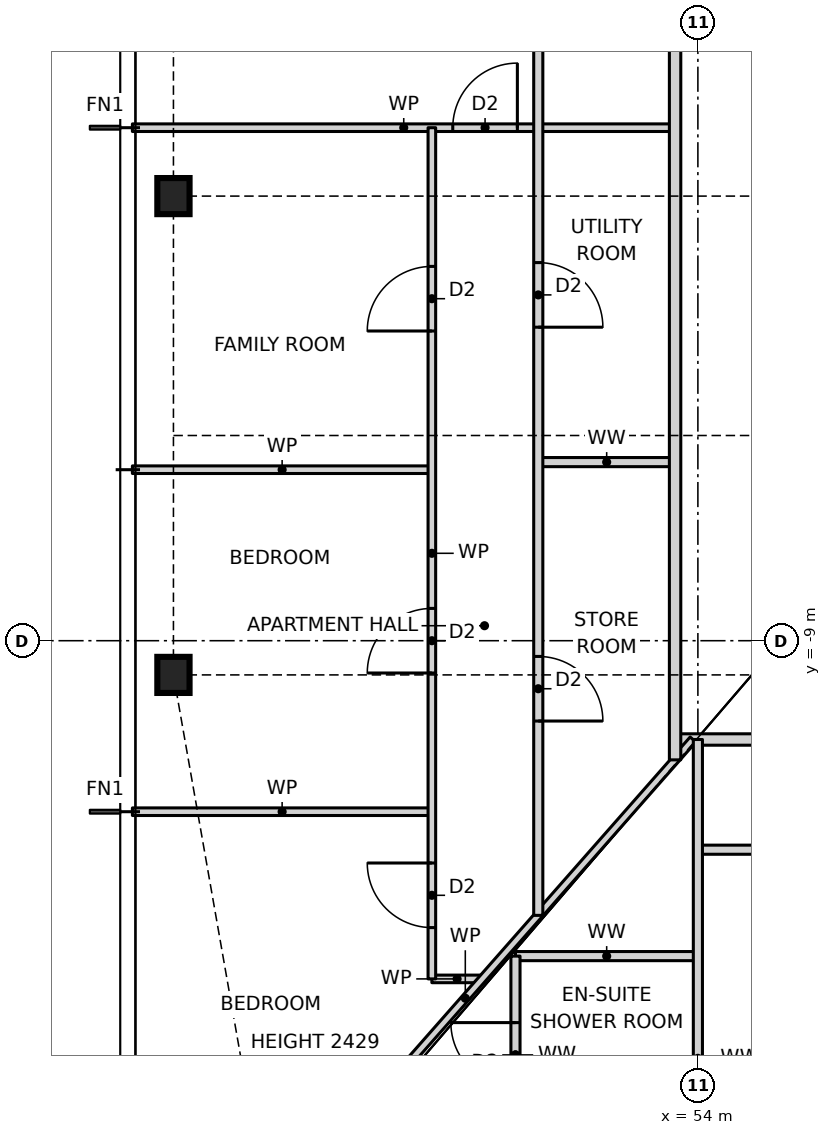
"""IFC4 building model, lengths in metres.
Left out: names, types, materials, properties, quantities, classifications, styles, units other than length and angle.
Written with IfcOpenShell. Run it as: python <this file> out.ifc"""

import sys

from ifc_helpers import new_model, si_unit, direction, frame, frame_2d, origin, origin_2d, place, context, subcontext, project, spatial, rectangle, i_section, extrude, element, fill, save


model = new_model("IFC4")
c1 = context("Model", 3, precision=1e-05, world=origin(), true_north=direction((0.0, 1.0)))
c2 = subcontext(c1, "Body", "Model", "MODEL_VIEW")
j1 = project(units=[si_unit("LENGTHUNIT", "METRE"), si_unit("PLANEANGLEUNIT", "RADIAN")], contexts=[c1])
p1 = place(None, origin())
s1 = spatial("IfcSite", under=j1, at=p1, CompositionType="ELEMENT")
p2 = place(p1, origin())
s2 = spatial("IfcBuilding", under=s1, at=p2, CompositionType="ELEMENT")
p3 = place(p2, frame((0.0, 0.0, 25.5)))
s3 = spatial("IfcBuildingStorey", under=s2, at=p3, CompositionType="ELEMENT", Elevation=25.5)
for number, where, z_axis, x_axis in (
    (1, (47.1, -3.15, 0.0), (0.0, 0.0, 1.0), (1.0, 0.0, 0.0)),
    (2, (47.1, -9.45, 0.0), (0.0, 0.0, 1.0), (1.0, 0.0, 0.0)),
):
    element("IfcColumn", number, at=place(p3, frame(where, z_axis=z_axis, x_axis=x_axis)), inside=s3, PredefinedType="COLUMN", context=c2, shape_type="SweptSolid", body=[
        extrude(i_section(OverallWidth=0.424, OverallDepth=0.475, WebThickness=0.048, FlangeThickness=0.077, at=origin_2d()), origin(), (0.0, 0.0, 1.0), 3.5),
    ])
p4 = place(p3, frame((50.5, -13.45, 0.0), z_axis=(0.0, 0.0, 1.0), x_axis=(1.0, 0.0, 0.0)))
e3 = element("IfcWall", 3, at=p4, inside=s3, PredefinedType="PARTITIONING", context=c2, shape_type="SweptSolid", body=[
    extrude(rectangle(XDim=0.664, YDim=0.1, at=frame_2d((0.332, 0.0))), origin(), (0.0, 0.0, 1.0), 3.27),
])
p5 = place(p3, frame((51.6, -13.15, 0.0), z_axis=(0.0, 0.0, 1.0), x_axis=(1.0, 0.0, 0.0)))
e4 = element("IfcWall", 4, at=p5, inside=s3, PredefinedType="PARTITIONING", context=c2, shape_type="SweptSolid", body=[
    extrude(rectangle(XDim=2.4, YDim=0.12, at=frame_2d((1.2, 0.0))), origin(), (0.0, 0.0, 1.0), 3.27),
])
p6 = place(p3, frame((54.0, -11.75, 0.0), z_axis=(0.0, 0.0, 1.0), x_axis=(1.0, 0.0, 0.0)))
e5 = element("IfcWall", 5, at=p6, inside=s3, PredefinedType="PARTITIONING", context=c2, shape_type="SweptSolid", body=[
    extrude(rectangle(XDim=19.34, YDim=0.12, at=frame_2d((9.67, 0.0))), origin(), (0.0, 0.0, 1.0), 3.27),
])
p7 = place(p6, frame((1.375, 0.0, 0.0)))
e6 = element("IfcOpeningElement", 6, at=p7, cuts=e5, PredefinedType="OPENING", context=c2, shape_type="SweptSolid", body=[
    extrude(rectangle(XDim=0.85, YDim=2.1, at=frame_2d((0.425, 1.05))), frame((0.0, 0.07, 0.0), z_axis=(0.0, -1.0, 0.0), x_axis=(1.0, 0.0, 0.0)), (0.0, 0.0, 1.0), 0.14),
])
p8 = place(p6, frame((4.575, 0.0, 0.0)))
e7 = element("IfcOpeningElement", 7, at=p8, cuts=e5, PredefinedType="OPENING", context=c2, shape_type="SweptSolid", body=[
    extrude(rectangle(XDim=0.85, YDim=2.1, at=frame_2d((0.425, 1.05))), frame((0.0, 0.07, 0.0), z_axis=(0.0, -1.0, 0.0), x_axis=(1.0, 0.0, 0.0)), (0.0, 0.0, 1.0), 0.14),
])
p9 = place(p6, frame((11.325, 0.0, 0.0)))
e8 = element("IfcOpeningElement", 8, at=p9, cuts=e5, PredefinedType="OPENING", context=c2, shape_type="SweptSolid", body=[
    extrude(rectangle(XDim=0.85, YDim=2.1, at=frame_2d((0.425, 1.05))), frame((0.0, 0.07, 0.0), z_axis=(0.0, -1.0, 0.0), x_axis=(1.0, 0.0, 0.0)), (0.0, 0.0, 1.0), 0.14),
])
p10 = place(p6, frame((16.495, 0.0, 0.0)))
e9 = element("IfcOpeningElement", 9, at=p10, cuts=e5, PredefinedType="OPENING", context=c2, shape_type="SweptSolid", body=[
    extrude(rectangle(XDim=0.85, YDim=2.1, at=frame_2d((0.425, 1.05))), frame((0.0, 0.07, 0.0), z_axis=(0.0, -1.0, 0.0), x_axis=(1.0, 0.0, 0.0)), (0.0, 0.0, 1.0), 0.14),
])
p11 = place(p3, frame((46.56, -11.25, 0.0), z_axis=(0.0, 0.0, 1.0), x_axis=(1.0, 0.0, 0.0)))
e10 = element("IfcWall", 10, at=p11, inside=s3, PredefinedType="PARTITIONING", context=c2, shape_type="SweptSolid", body=[
    extrude(rectangle(XDim=3.94, YDim=0.1, at=frame_2d((1.97, 0.0))), origin(), (0.0, 0.0, 1.0), 3.27),
])
p12 = place(p3, frame((53.7, -10.3, 0.0), z_axis=(0.0, 0.0, 1.0), x_axis=(1.0, 0.0, 0.0)))
e11 = element("IfcWall", 11, at=p12, inside=s3, PredefinedType="PARTITIONING", context=c2, shape_type="SweptSolid", body=[
    extrude(rectangle(XDim=18.6, YDim=0.15, at=frame_2d((9.3, 0.0))), origin(), (0.0, 0.0, 1.0), 3.27),
])
p13 = place(p12, frame((4.8, 0.0, 0.0)))
e12 = element("IfcOpeningElement", 12, at=p13, cuts=e11, PredefinedType="OPENING", context=c2, shape_type="SweptSolid", body=[
    extrude(rectangle(XDim=1.0, YDim=2.1, at=frame_2d((0.5, 1.05))), frame((0.0, 0.085, 0.0), z_axis=(0.0, -1.0, 0.0), x_axis=(1.0, 0.0, 0.0)), (0.0, 0.0, 1.0), 0.17),
])
p14 = place(p3, frame((46.56, -6.75, 0.0), z_axis=(0.0, 0.0, 1.0), x_axis=(1.0, 0.0, 0.0)))
e13 = element("IfcWall", 13, at=p14, inside=s3, PredefinedType="PARTITIONING", context=c2, shape_type="SweptSolid", body=[
    extrude(rectangle(XDim=3.94, YDim=0.1, at=frame_2d((1.97, 0.0))), origin(), (0.0, 0.0, 1.0), 3.27),
])
p15 = place(p3, frame((51.9, -6.65, 0.0), z_axis=(0.0, 0.0, 1.0), x_axis=(1.0, 0.0, 0.0)))
e14 = element("IfcWall", 14, at=p15, inside=s3, PredefinedType="PARTITIONING", context=c2, shape_type="SweptSolid", body=[
    extrude(rectangle(XDim=1.8, YDim=0.12, at=frame_2d((0.9, 0.0))), origin(), (0.0, 0.0, 1.0), 3.27),
])
p16 = place(p3, frame((46.56, -2.25, 0.0), z_axis=(0.0, 0.0, 1.0), x_axis=(1.0, 0.0, 0.0)))
e15 = element("IfcWall", 15, at=p16, inside=s3, PredefinedType="PARTITIONING", context=c2, shape_type="SweptSolid", body=[
    extrude(rectangle(XDim=7.14, YDim=0.1, at=frame_2d((3.57, 0.0))), origin(), (0.0, 0.0, 1.0), 3.27),
])
p17 = place(p16, frame((4.215, 0.0, 0.0)))
e16 = element("IfcOpeningElement", 16, at=p17, cuts=e15, PredefinedType="OPENING", context=c2, shape_type="SweptSolid", body=[
    extrude(rectangle(XDim=0.85, YDim=2.1, at=frame_2d((0.425, 1.05))), frame((0.0, 0.06, 0.0), z_axis=(0.0, -1.0, 0.0), x_axis=(1.0, 0.0, 0.0)), (0.0, 0.0, 1.0), 0.12),
])
p18 = place(p3, frame((47.944, -17.109, 0.0), z_axis=(0.0, 0.0, 1.0), x_axis=(0.660638210404, 0.750704439146, 0.0)))
e17 = element("IfcWall", 17, at=p18, inside=s3, PredefinedType="PARTITIONING", context=c2, shape_type="SweptSolid", body=[
    extrude(rectangle(XDim=9.07, YDim=0.1, at=frame_2d((4.535, 0.0))), origin(), (0.0, 0.0, 1.0), 2.429),
])
p19 = place(p3, frame((54.0, -18.69, 0.0), z_axis=(0.0, 0.0, 1.0), x_axis=(0.0, 1.0, 0.0)))
e18 = element("IfcWall", 18, at=p19, inside=s3, PredefinedType="PARTITIONING", context=c2, shape_type="SweptSolid", body=[
    extrude(rectangle(XDim=8.39, YDim=0.12, at=frame_2d((4.195, 0.0))), origin(), (0.0, 0.0, 1.0), 3.27),
])
p20 = place(p19, frame((1.045, 0.0, 0.0)))
e19 = element("IfcOpeningElement", 19, at=p20, cuts=e18, PredefinedType="OPENING", context=c2, shape_type="SweptSolid", body=[
    extrude(rectangle(XDim=0.85, YDim=2.1, at=frame_2d((0.425, 1.05))), frame((0.0, 0.07, 0.0), z_axis=(0.0, -1.0, 0.0), x_axis=(1.0, 0.0, 0.0)), (0.0, 0.0, 1.0), 0.14),
])
p21 = place(p3, frame((53.7, -10.568, 0.0), z_axis=(0.0, 0.0, 1.0), x_axis=(0.0, 1.0, 0.0)))
e20 = element("IfcWall", 20, at=p21, inside=s3, PredefinedType="PARTITIONING", context=c2, shape_type="SweptSolid", body=[
    extrude(rectangle(XDim=21.136, YDim=0.15, at=frame_2d((10.568, 0.0))), origin(), (0.0, 0.0, 1.0), 3.27),
])
p22 = place(p21, frame((11.818, 0.0, 0.0)))
e21 = element("IfcOpeningElement", 21, at=p22, cuts=e20, PredefinedType="OPENING", context=c2, shape_type="SweptSolid", body=[
    extrude(rectangle(XDim=1.0, YDim=2.1, at=frame_2d((0.5, 1.05))), frame((0.0, 0.085, 0.0), z_axis=(0.0, -1.0, 0.0), x_axis=(1.0, 0.0, 0.0)), (0.0, 0.0, 1.0), 0.17),
])
p23 = place(p3, frame((51.9, -12.614, 0.0), z_axis=(0.0, 0.0, 1.0), x_axis=(0.0, 1.0, 0.0)))
e22 = element("IfcWall", 22, at=p23, inside=s3, PredefinedType="PARTITIONING", context=c2, shape_type="SweptSolid", body=[
    extrude(rectangle(XDim=25.228, YDim=0.12, at=frame_2d((12.614, 0.0))), origin(), (0.0, 0.0, 1.0), 3.27),
])
p24 = place(p23, frame((17.139, 0.0, 0.0)))
e23 = element("IfcOpeningElement", 23, at=p24, cuts=e22, PredefinedType="OPENING", context=c2, shape_type="SweptSolid", body=[
    extrude(rectangle(XDim=0.85, YDim=2.1, at=frame_2d((0.425, 1.05))), frame((0.0, 0.07, 0.0), z_axis=(0.0, -1.0, 0.0), x_axis=(1.0, 0.0, 0.0)), (0.0, 0.0, 1.0), 0.14),
])
p25 = place(p23, frame((13.939, 0.0, 0.0)))
e24 = element("IfcOpeningElement", 24, at=p25, cuts=e22, PredefinedType="OPENING", context=c2, shape_type="SweptSolid", body=[
    extrude(rectangle(XDim=0.85, YDim=2.1, at=frame_2d((0.425, 1.05))), frame((0.0, 0.07, 0.0), z_axis=(0.0, -1.0, 0.0), x_axis=(1.0, 0.0, 0.0)), (0.0, 0.0, 1.0), 0.14),
])
p26 = place(p23, frame((21.871, 0.0, 0.0)))
e25 = element("IfcOpeningElement", 25, at=p26, cuts=e22, PredefinedType="OPENING", context=c2, shape_type="SweptSolid", body=[
    extrude(rectangle(XDim=0.85, YDim=2.1, at=frame_2d((0.425, 1.05))), frame((0.0, 0.07, 0.0), z_axis=(0.0, -1.0, 0.0), x_axis=(1.0, 0.0, 0.0)), (0.0, 0.0, 1.0), 0.14),
])
p27 = place(p23, frame((7.739, 0.0, 0.0)))
e26 = element("IfcOpeningElement", 26, at=p27, cuts=e22, PredefinedType="OPENING", context=c2, shape_type="SweptSolid", body=[
    extrude(rectangle(XDim=0.85, YDim=2.1, at=frame_2d((0.425, 1.05))), frame((0.0, 0.07, 0.0), z_axis=(0.0, -1.0, 0.0), x_axis=(1.0, 0.0, 0.0)), (0.0, 0.0, 1.0), 0.14),
])
p28 = place(p23, frame((2.557, 0.0, 0.0)))
e27 = element("IfcOpeningElement", 27, at=p28, cuts=e22, PredefinedType="OPENING", context=c2, shape_type="SweptSolid", body=[
    extrude(rectangle(XDim=0.85, YDim=2.1, at=frame_2d((0.425, 1.05))), frame((0.0, 0.07, 0.0), z_axis=(0.0, -1.0, 0.0), x_axis=(1.0, 0.0, 0.0)), (0.0, 0.0, 1.0), 0.14),
])
p29 = place(p3, frame((51.6, -15.75, 0.0), z_axis=(0.0, 0.0, 1.0), x_axis=(0.0, 1.0, 0.0)))
e28 = element("IfcWall", 28, at=p29, inside=s3, PredefinedType="PARTITIONING", context=c2, shape_type="SweptSolid", body=[
    extrude(rectangle(XDim=2.6, YDim=0.12, at=frame_2d((1.3, 0.0))), origin(), (0.0, 0.0, 1.0), 3.27),
])
p30 = place(p29, frame((0.875, 0.0, 0.0)))
e29 = element("IfcOpeningElement", 29, at=p30, cuts=e28, PredefinedType="OPENING", context=c2, shape_type="SweptSolid", body=[
    extrude(rectangle(XDim=0.85, YDim=2.1, at=frame_2d((0.425, 1.05))), frame((0.0, 0.07, 0.0), z_axis=(0.0, -1.0, 0.0), x_axis=(1.0, 0.0, 0.0)), (0.0, 0.0, 1.0), 0.14),
])
p31 = place(p3, frame((50.5, -13.45, 0.0), z_axis=(0.0, 0.0, 1.0), x_axis=(0.0, 1.0, 0.0)))
e30 = element("IfcWall", 30, at=p31, inside=s3, PredefinedType="PARTITIONING", context=c2, shape_type="SweptSolid", body=[
    extrude(rectangle(XDim=11.2, YDim=0.1, at=frame_2d((5.6, 0.0))), origin(), (0.0, 0.0, 1.0), 3.27),
])
p32 = place(p31, frame((8.525, 0.0, 0.0)))
e31 = element("IfcOpeningElement", 31, at=p32, cuts=e30, PredefinedType="OPENING", context=c2, shape_type="SweptSolid", body=[
    extrude(rectangle(XDim=0.85, YDim=2.1, at=frame_2d((0.425, 1.05))), frame((0.0, 0.06, 0.0), z_axis=(0.0, -1.0, 0.0), x_axis=(1.0, 0.0, 0.0)), (0.0, 0.0, 1.0), 0.12),
])
p33 = place(p31, frame((4.025, 0.0, 0.0)))
e32 = element("IfcOpeningElement", 32, at=p33, cuts=e30, PredefinedType="OPENING", context=c2, shape_type="SweptSolid", body=[
    extrude(rectangle(XDim=0.85, YDim=2.1, at=frame_2d((0.425, 1.05))), frame((0.0, 0.06, 0.0), z_axis=(0.0, -1.0, 0.0), x_axis=(1.0, 0.0, 0.0)), (0.0, 0.0, 1.0), 0.12),
])
p34 = place(p31, frame((0.675, 0.0, 0.0)))
e33 = element("IfcOpeningElement", 33, at=p34, cuts=e30, PredefinedType="OPENING", context=c2, shape_type="SweptSolid", body=[
    extrude(rectangle(XDim=0.85, YDim=2.1, at=frame_2d((0.425, 1.05))), frame((0.0, 0.06, 0.0), z_axis=(0.0, -1.0, 0.0), x_axis=(1.0, 0.0, 0.0)), (0.0, 0.0, 1.0), 0.12),
])
p35 = place(p30, origin())
e34 = element("IfcDoor", 34, at=p35, inside=s3, OperationType="SINGLE_SWING_RIGHT", PredefinedType="DOOR", context=c2, shape_type="SweptSolid", body=[
    extrude(rectangle(XDim=0.85, YDim=2.1, at=frame_2d((0.425, 1.05))), frame((0.0, 0.025, 0.0), z_axis=(0.0, -1.0, 0.0), x_axis=(1.0, 0.0, 0.0)), (0.0, 0.0, 1.0), 0.05),
])
fill(e29, e34)
p36 = place(p17, origin())
e35 = element("IfcDoor", 35, at=p36, inside=s3, OperationType="SINGLE_SWING_RIGHT", PredefinedType="DOOR", context=c2, shape_type="SweptSolid", body=[
    extrude(rectangle(XDim=0.85, YDim=2.1, at=frame_2d((0.425, 1.05))), frame((0.0, 0.025, 0.0), z_axis=(0.0, -1.0, 0.0), x_axis=(1.0, 0.0, 0.0)), (0.0, 0.0, 1.0), 0.05),
])
fill(e16, e35)
p37 = place(p32, origin())
e36 = element("IfcDoor", 36, at=p37, inside=s3, OperationType="SINGLE_SWING_LEFT", PredefinedType="DOOR", context=c2, shape_type="SweptSolid", body=[
    extrude(rectangle(XDim=0.85, YDim=2.1, at=frame_2d((0.425, 1.05))), frame((0.0, 0.025, 0.0), z_axis=(0.0, -1.0, 0.0), x_axis=(1.0, 0.0, 0.0)), (0.0, 0.0, 1.0), 0.05),
])
fill(e31, e36)
p38 = place(p33, origin())
e37 = element("IfcDoor", 37, at=p38, inside=s3, OperationType="SINGLE_SWING_LEFT", PredefinedType="DOOR", context=c2, shape_type="SweptSolid", body=[
    extrude(rectangle(XDim=0.85, YDim=2.1, at=frame_2d((0.425, 1.05))), frame((0.0, 0.025, 0.0), z_axis=(0.0, -1.0, 0.0), x_axis=(1.0, 0.0, 0.0)), (0.0, 0.0, 1.0), 0.05),
])
fill(e32, e37)
p39 = place(p34, origin())
e38 = element("IfcDoor", 38, at=p39, inside=s3, OperationType="SINGLE_SWING_RIGHT", PredefinedType="DOOR", context=c2, shape_type="SweptSolid", body=[
    extrude(rectangle(XDim=0.85, YDim=2.1, at=frame_2d((0.425, 1.05))), frame((0.0, 0.025, 0.0), z_axis=(0.0, -1.0, 0.0), x_axis=(1.0, 0.0, 0.0)), (0.0, 0.0, 1.0), 0.05),
])
fill(e33, e38)
p40 = place(p27, frame((0.85, 0.0, 0.0), z_axis=(0.0, 0.0, 1.0), x_axis=(-1.0, 0.0, 0.0)))
e39 = element("IfcDoor", 39, at=p40, inside=s3, OperationType="SINGLE_SWING_RIGHT", PredefinedType="DOOR", context=c2, shape_type="SweptSolid", body=[
    extrude(rectangle(XDim=0.85, YDim=2.1, at=frame_2d((0.425, 1.05))), frame((0.0, 0.025, 0.0), z_axis=(0.0, -1.0, 0.0), x_axis=(1.0, 0.0, 0.0)), (0.0, 0.0, 1.0), 0.05),
])
fill(e26, e39)
p41 = place(p28, frame((0.85, 0.0, 0.0), z_axis=(0.0, 0.0, 1.0), x_axis=(-1.0, 0.0, 0.0)))
e40 = element("IfcDoor", 40, at=p41, inside=s3, OperationType="SINGLE_SWING_RIGHT", PredefinedType="DOOR", context=c2, shape_type="SweptSolid", body=[
    extrude(rectangle(XDim=0.85, YDim=2.1, at=frame_2d((0.425, 1.05))), frame((0.0, 0.025, 0.0), z_axis=(0.0, -1.0, 0.0), x_axis=(1.0, 0.0, 0.0)), (0.0, 0.0, 1.0), 0.05),
])
fill(e27, e40)
save(model, sys.argv[1])
